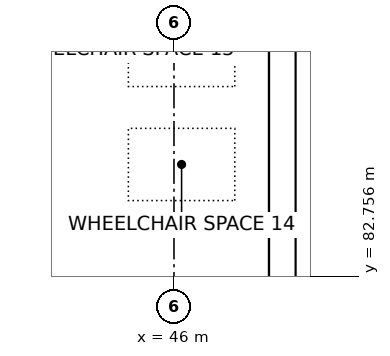
"""IFC4 building model, lengths in metres.
Left out: names, types, materials, properties, quantities, classifications, styles, units other than length and angle.
Written with IfcOpenShell. Run it as: python <this file> out.ifc"""

import sys

from ifc_helpers import new_model, si_unit, direction, frame, origin, origin_2d, place, context, subcontext, project, spatial, rectangle, extrude, element, save


model = new_model("IFC4")
c1 = context("Model", 3, precision=1e-05, world=origin(), true_north=direction((0.0, 1.0)))
c2 = subcontext(c1, "Body", "Model", "MODEL_VIEW")
j1 = project(units=[si_unit("LENGTHUNIT", "METRE"), si_unit("PLANEANGLEUNIT", "RADIAN")], contexts=[c1])
p1 = place(None, origin())
s1 = spatial("IfcSite", under=j1, at=p1, CompositionType="ELEMENT")
p2 = place(p1, origin())
s2 = spatial("IfcBuilding", under=s1, at=p2, CompositionType="ELEMENT")
p3 = place(p2, origin())
s3 = spatial("IfcBuildingStorey", under=s2, at=p3, CompositionType="ELEMENT", Elevation=0.0)
p4 = place(p3, frame((47.25, 84.757, -0.3), z_axis=(0.0, 0.0, 1.0), x_axis=(1.0, 0.0, 0.0)))
e1 = element("IfcColumn", 1, at=p4, inside=s3, PredefinedType="COLUMN", context=c2, shape_type="SweptSolid", body=[
    extrude(rectangle(XDim=0.7, YDim=0.7, at=origin_2d()), origin(), (0.0, 0.0, 1.0), 1.8),
])
save(model, sys.argv[1])
